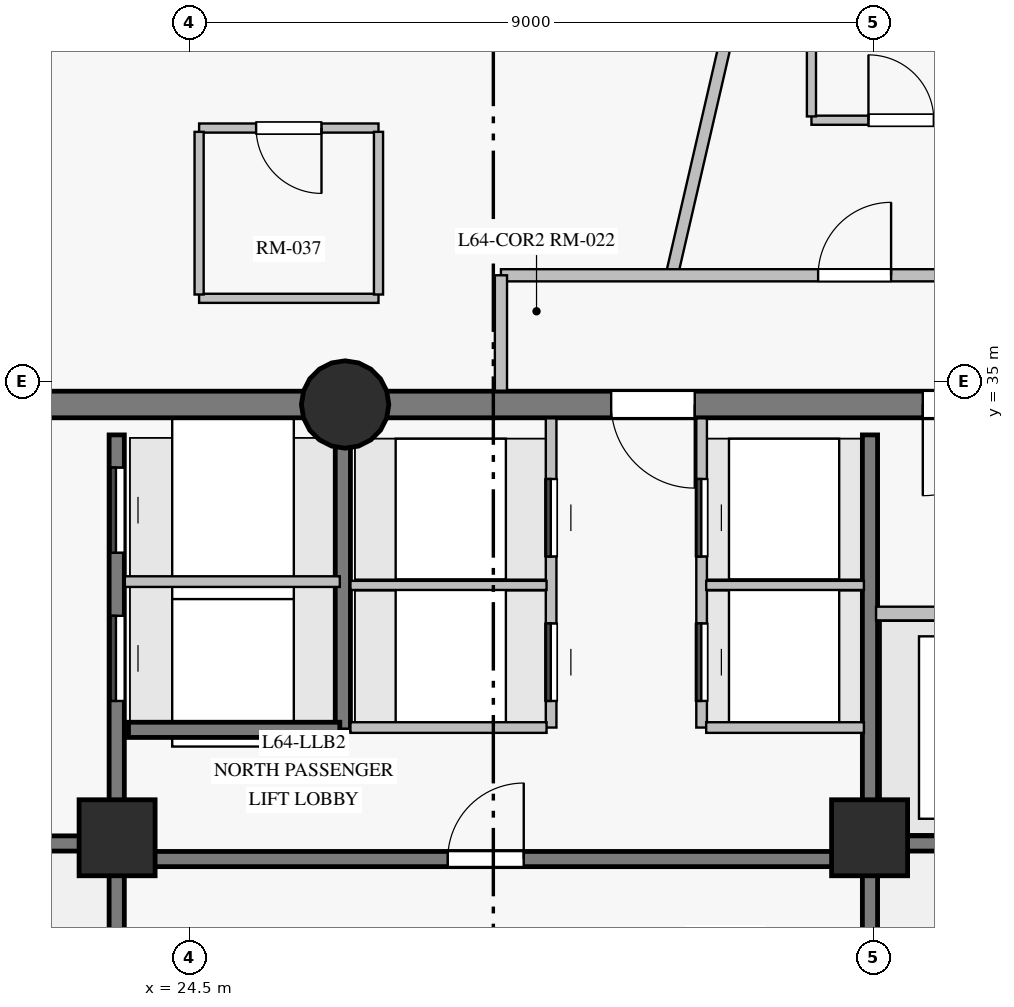
"""IFC4 building model, lengths in metres.
Left out: names, types, materials, properties, quantities, classifications, styles, units other than length and angle.
Written with IfcOpenShell. Run it as: python <this file> out.ifc"""

import sys

from ifc_helpers import new_model, si_unit, direction, frame, frame_2d, origin, origin_with_axes, origin_2d, place, context, subcontext, project, spatial, rectangle, circle, extrude, source, transform, mapped, element, fill, save


model = new_model("IFC4")
c1 = context("Model", 3, precision=1e-05, world=origin(), true_north=direction((0.0, 1.0)))
c2 = subcontext(c1, "Body", "Model", "MODEL_VIEW")
j1 = project(units=[si_unit("LENGTHUNIT", "METRE"), si_unit("PLANEANGLEUNIT", "RADIAN")], contexts=[c1])
p1 = place(None, origin())
s1 = spatial("IfcSite", under=j1, at=p1, CompositionType="ELEMENT")
p2 = place(p1, origin())
s2 = spatial("IfcBuilding", under=s1, at=p2, CompositionType="ELEMENT")
p3 = place(p2, frame((0.0, 0.0, 219.95)))
s3 = spatial("IfcBuildingStorey", under=s2, at=p3, CompositionType="ELEMENT", Elevation=219.95)
p4 = place(p3, frame((37.5, 34.7, 0.0), z_axis=(0.0, 0.0, 1.0), x_axis=(-1.0, 0.0, 0.0)))
e1 = element("IfcWall", 1, at=p4, inside=s3, PredefinedType="SHEAR", context=c2, shape_type="SweptSolid", body=[
    extrude(rectangle(XDim=10.95, YDim=0.35, at=frame_2d((5.475, 0.0))), origin(), (0.0, 0.0, 1.0), 2.85),
])
p5 = place(p4, frame((2.15, 0.0, 0.0)))
e2 = element("IfcOpeningElement", 2, at=p5, cuts=e1, PredefinedType="OPENING", context=c2, shape_type="SweptSolid", body=[
    extrude(rectangle(XDim=1.2, YDim=2.15, at=frame_2d((0.6, 1.075))), frame((0.0, 0.185, 0.0), z_axis=(0.0, -1.0, 0.0), x_axis=(1.0, 0.0, 0.0)), (0.0, 0.0, 1.0), 0.37),
])
p6 = place(p4, frame((6.35, 0.0, 0.0)))
e3 = element("IfcOpeningElement", 3, at=p6, cuts=e1, PredefinedType="OPENING", context=c2, shape_type="SweptSolid", body=[
    extrude(rectangle(XDim=1.1, YDim=2.15, at=frame_2d((0.55, 1.075))), frame((0.0, 0.185, 0.0), z_axis=(0.0, -1.0, 0.0), x_axis=(1.0, 0.0, 0.0)), (0.0, 0.0, 1.0), 0.37),
])
p7 = place(p3, frame((26.55, 34.7, 0.0), z_axis=(0.0, 0.0, 1.0), x_axis=(-1.0, 0.0, 0.0)))
e4 = element("IfcWall", 4, at=p7, inside=s3, PredefinedType="SHEAR", context=c2, shape_type="SweptSolid", body=[
    extrude(rectangle(XDim=7.05, YDim=0.35, at=frame_2d((3.525, 0.0))), origin(), (0.0, 0.0, 1.0), 2.85),
])
m1 = source(origin_with_axes(), c2, "Body", "SweptSolid", [
    extrude(circle(Radius=0.575, at=origin_2d()), origin(), (0.0, 0.0, 1.0), 3.05),
])
p8 = place(p3, frame((26.55, 34.7, 0.0), z_axis=(0.0, 0.0, 1.0), x_axis=(1.0, 0.0, 0.0)))
e5 = element("IfcColumn", 5, at=p8, inside=s3, PredefinedType="COLUMN", context=c2, shape_type="MappedRepresentation", body=[
    mapped(m1, transform((0.0, 0.0, 0.0), scale=1.0)),
])
m2 = source(origin_with_axes(), c2, "Body", "SweptSolid", [
    extrude(rectangle(XDim=1.0, YDim=1.0, at=origin_2d()), origin(), (0.0, 0.0, 1.0), 3.05),
])
for number, where, z_axis, x_axis in (
    (6, (23.55, 29.0, 0.0), (0.0, 0.0, 1.0), (1.0, 0.0, 0.0)),
    (7, (33.45, 29.0, 0.0), (0.0, 0.0, 1.0), (1.0, 0.0, 0.0)),
):
    element("IfcColumn", number, at=place(p3, frame(where, z_axis=z_axis, x_axis=x_axis)), inside=s3, PredefinedType="COLUMN", context=c2, shape_type="MappedRepresentation", body=[
        mapped(m2, transform((0.0, 0.0, 0.0), scale=1.0)),
    ])
p9 = place(p3, frame((23.545, 18.7, 0.0), z_axis=(0.0, 0.0, 1.0), x_axis=(0.0, 1.0, 0.0)))
e8 = element("IfcWall", 8, at=p9, inside=s3, PredefinedType="SHEAR", context=c2, shape_type="SweptSolid", body=[
    extrude(rectangle(XDim=15.6, YDim=0.2, at=frame_2d((7.8, 0.0))), origin(), (0.0, 0.0, 1.0), 2.85),
])
p10 = place(p9, frame((2.75, 0.0, 0.0)))
e9 = element("IfcOpeningElement", 9, at=p10, cuts=e8, PredefinedType="OPENING", context=c2, shape_type="SweptSolid", body=[
    extrude(rectangle(XDim=1.15, YDim=2.15, at=frame_2d((0.575, 1.075))), frame((0.0, 0.11, 0.0), z_axis=(0.0, -1.0, 0.0), x_axis=(1.0, 0.0, 0.0)), (0.0, 0.0, 1.0), 0.22),
])
p11 = place(p9, frame((0.14, 0.0, 0.0)))
e10 = element("IfcOpeningElement", 10, at=p11, cuts=e8, PredefinedType="OPENING", context=c2, shape_type="SweptSolid", body=[
    extrude(rectangle(XDim=0.88, YDim=2.1, at=frame_2d((0.44, 1.05))), frame((0.0, 0.11, 0.0), z_axis=(0.0, -1.0, 0.0), x_axis=(1.0, 0.0, 0.0)), (0.0, 0.0, 1.0), 0.22),
])
p12 = place(p9, frame((1.36, 0.0, 0.0)))
e11 = element("IfcOpeningElement", 11, at=p12, cuts=e8, PredefinedType="OPENING", context=c2, shape_type="SweptSolid", body=[
    extrude(rectangle(XDim=0.88, YDim=2.1, at=frame_2d((0.44, 1.05))), frame((0.0, 0.11, 0.0), z_axis=(0.0, -1.0, 0.0), x_axis=(1.0, 0.0, 0.0)), (0.0, 0.0, 1.0), 0.22),
])
p13 = place(p9, frame((12.1, 0.0, 0.0)))
e12 = element("IfcOpeningElement", 12, at=p13, cuts=e8, PredefinedType="OPENING", context=c2, shape_type="SweptSolid", body=[
    extrude(rectangle(XDim=1.12, YDim=2.15, at=frame_2d((0.56, 1.075))), frame((0.0, 0.11, 0.0), z_axis=(0.0, -1.0, 0.0), x_axis=(1.0, 0.0, 0.0)), (0.0, 0.0, 1.0), 0.22),
])
p14 = place(p9, frame((14.05, 0.0, 0.0)))
e13 = element("IfcOpeningElement", 13, at=p14, cuts=e8, PredefinedType="OPENING", context=c2, shape_type="SweptSolid", body=[
    extrude(rectangle(XDim=1.12, YDim=2.15, at=frame_2d((0.56, 1.075))), frame((0.0, 0.11, 0.0), z_axis=(0.0, -1.0, 0.0), x_axis=(1.0, 0.0, 0.0)), (0.0, 0.0, 1.0), 0.22),
])
p15 = place(p3, frame((33.455, 18.7, 0.0), z_axis=(0.0, 0.0, 1.0), x_axis=(0.0, 1.0, 0.0)))
e14 = element("IfcWall", 14, at=p15, inside=s3, PredefinedType="SHEAR", context=c2, shape_type="SweptSolid", body=[
    extrude(rectangle(XDim=15.6, YDim=0.2, at=frame_2d((7.8, 0.0))), origin(), (0.0, 0.0, 1.0), 2.85),
])
p16 = place(p15, frame((2.75, 0.0, 0.0)))
e15 = element("IfcOpeningElement", 15, at=p16, cuts=e14, PredefinedType="OPENING", context=c2, shape_type="SweptSolid", body=[
    extrude(rectangle(XDim=1.15, YDim=2.15, at=frame_2d((0.575, 1.075))), frame((0.0, 0.11, 0.0), z_axis=(0.0, -1.0, 0.0), x_axis=(1.0, 0.0, 0.0)), (0.0, 0.0, 1.0), 0.22),
])
p17 = place(p15, frame((0.55, 0.0, 0.0)))
e16 = element("IfcOpeningElement", 16, at=p17, cuts=e14, PredefinedType="OPENING", context=c2, shape_type="SweptSolid", body=[
    extrude(rectangle(XDim=0.94, YDim=2.1, at=frame_2d((0.47, 1.05))), frame((0.0, 0.11, 0.0), z_axis=(0.0, -1.0, 0.0), x_axis=(1.0, 0.0, 0.0)), (0.0, 0.0, 1.0), 0.22),
])
p18 = place(p3, frame((23.7, 28.72, 0.0), z_axis=(0.0, 0.0, 1.0), x_axis=(1.0, 0.0, 0.0)))
e17 = element("IfcWall", 17, at=p18, inside=s3, PredefinedType="SHEAR", context=c2, shape_type="SweptSolid", body=[
    extrude(rectangle(XDim=9.6, YDim=0.2, at=frame_2d((4.8, 0.0))), origin(), (0.0, 0.0, 1.0), 2.85),
])
p19 = place(p18, frame((4.2, 0.0, 0.0)))
e18 = element("IfcOpeningElement", 18, at=p19, cuts=e17, PredefinedType="OPENING", context=c2, shape_type="SweptSolid", body=[
    extrude(rectangle(XDim=1.0, YDim=2.15, at=frame_2d((0.5, 1.075))), frame((0.0, 0.11, 0.0), z_axis=(0.0, -1.0, 0.0), x_axis=(1.0, 0.0, 0.0)), (0.0, 0.0, 1.0), 0.22),
])
for number, where, z_axis, x_axis in (
    (19, (33.455, 28.925, 0.0), (0.0, 0.0, 1.0), (1.0, 0.0, 0.0)),
    (20, (19.55, 28.925, 0.0), (0.0, 0.0, 1.0), (1.0, 0.0, 0.0)),
):
    element("IfcWall", number, at=place(p3, frame(where, z_axis=z_axis, x_axis=x_axis)), inside=s3, PredefinedType="SHEAR", context=c2, shape_type="SweptSolid", body=[
        extrude(rectangle(XDim=3.995, YDim=0.2, at=frame_2d((1.998, 0.0))), origin(), (0.0, 0.0, 1.0), 2.85),
    ])
p20 = place(p3, frame((26.52, 30.42, 0.0), z_axis=(0.0, 0.0, 1.0), x_axis=(0.0, 1.0, 0.0)))
e21 = element("IfcWall", 21, at=p20, inside=s3, PredefinedType="SHEAR", context=c2, shape_type="SweptSolid", body=[
    extrude(rectangle(XDim=3.86, YDim=0.2, at=frame_2d((1.93, 0.0))), origin(), (0.0, 0.0, 1.0), 2.85),
])
p21 = place(p3, frame((23.7, 30.42, 0.0), z_axis=(0.0, 0.0, 1.0), x_axis=(1.0, 0.0, 0.0)))
e22 = element("IfcWall", 22, at=p21, inside=s3, PredefinedType="SHEAR", context=c2, shape_type="SweptSolid", body=[
    extrude(rectangle(XDim=2.78, YDim=0.2, at=frame_2d((1.39, 0.0))), origin(), (0.0, 0.0, 1.0), 2.85),
])
p22 = place(p3, frame((30.84, 36.371, 0.0), z_axis=(0.0, 0.0, 1.0), x_axis=(0.224958696118, 0.974368300511, 0.0)))
e23 = element("IfcWall", 23, at=p22, inside=s3, PredefinedType="PARTITIONING", context=c2, shape_type="SweptSolid", body=[
    extrude(rectangle(XDim=11.864, YDim=0.16, at=frame_2d((5.932, 0.0))), origin(), (0.0, 0.0, 1.0), 2.85),
])
p23 = place(p3, frame((28.6, 36.4, 0.0), z_axis=(0.0, 0.0, 1.0), x_axis=(1.0, 0.0, 0.0)))
e24 = element("IfcWall", 24, at=p23, inside=s3, PredefinedType="PARTITIONING", context=c2, shape_type="SweptSolid", body=[
    extrude(rectangle(XDim=6.95, YDim=0.16, at=frame_2d((3.475, 0.0))), origin(), (0.0, 0.0, 1.0), 2.45),
])
p24 = place(p23, frame((4.173, 0.0, 0.0)))
e25 = element("IfcOpeningElement", 25, at=p24, cuts=e24, PredefinedType="OPENING", context=c2, shape_type="SweptSolid", body=[
    extrude(rectangle(XDim=0.96, YDim=2.15, at=frame_2d((0.48, 1.075))), frame((0.0, 0.09, 0.0), z_axis=(0.0, -1.0, 0.0), x_axis=(1.0, 0.0, 0.0)), (0.0, 0.0, 1.0), 0.18),
])
p25 = place(p3, frame((29.26, 30.45, 0.0), z_axis=(0.0, 0.0, 1.0), x_axis=(0.0, 1.0, 0.0)))
e26 = element("IfcWall", 26, at=p25, inside=s3, PredefinedType="PARTITIONING", context=c2, shape_type="SweptSolid", body=[
    extrude(rectangle(XDim=4.068, YDim=0.14, at=frame_2d((2.034, 0.0))), origin(), (0.0, 0.0, 1.0), 2.85),
])
p26 = place(p25, frame((0.35, 0.0, 0.0)))
e27 = element("IfcOpeningElement", 27, at=p26, cuts=e26, PredefinedType="OPENING", context=c2, shape_type="SweptSolid", body=[
    extrude(rectangle(XDim=1.02, YDim=2.15, at=frame_2d((0.51, 1.075))), frame((0.0, 0.08, 0.0), z_axis=(0.0, -1.0, 0.0), x_axis=(1.0, 0.0, 0.0)), (0.0, 0.0, 1.0), 0.16),
])
p27 = place(p25, frame((2.25, 0.0, 0.0)))
e28 = element("IfcOpeningElement", 28, at=p27, cuts=e26, PredefinedType="OPENING", context=c2, shape_type="SweptSolid", body=[
    extrude(rectangle(XDim=1.02, YDim=2.15, at=frame_2d((0.51, 1.075))), frame((0.0, 0.08, 0.0), z_axis=(0.0, -1.0, 0.0), x_axis=(1.0, 0.0, 0.0)), (0.0, 0.0, 1.0), 0.16),
])
p28 = place(p3, frame((31.24, 30.45, 0.0), z_axis=(0.0, 0.0, 1.0), x_axis=(0.0, 1.0, 0.0)))
e29 = element("IfcWall", 29, at=p28, inside=s3, PredefinedType="PARTITIONING", context=c2, shape_type="SweptSolid", body=[
    extrude(rectangle(XDim=4.068, YDim=0.14, at=frame_2d((2.034, 0.0))), origin(), (0.0, 0.0, 1.0), 2.85),
])
p29 = place(p28, frame((0.35, 0.0, 0.0)))
e30 = element("IfcOpeningElement", 30, at=p29, cuts=e29, PredefinedType="OPENING", context=c2, shape_type="SweptSolid", body=[
    extrude(rectangle(XDim=1.02, YDim=2.15, at=frame_2d((0.51, 1.075))), frame((0.0, 0.08, 0.0), z_axis=(0.0, -1.0, 0.0), x_axis=(1.0, 0.0, 0.0)), (0.0, 0.0, 1.0), 0.16),
])
p30 = place(p28, frame((2.25, 0.0, 0.0)))
e31 = element("IfcOpeningElement", 31, at=p30, cuts=e29, PredefinedType="OPENING", context=c2, shape_type="SweptSolid", body=[
    extrude(rectangle(XDim=1.02, YDim=2.15, at=frame_2d((0.51, 1.075))), frame((0.0, 0.08, 0.0), z_axis=(0.0, -1.0, 0.0), x_axis=(1.0, 0.0, 0.0)), (0.0, 0.0, 1.0), 0.16),
])
p31 = place(p3, frame((33.535, 31.95, 0.0), z_axis=(0.0, 0.0, 1.0), x_axis=(1.0, 0.0, 0.0)))
e32 = element("IfcWall", 32, at=p31, inside=s3, PredefinedType="PARTITIONING", context=c2, shape_type="SweptSolid", body=[
    extrude(rectangle(XDim=3.784, YDim=0.18, at=frame_2d((1.892, 0.0))), origin(), (0.0, 0.0, 1.0), 2.85),
])
p32 = place(p31, frame((0.9, 0.0, 0.0)))
e33 = element("IfcOpeningElement", 33, at=p32, cuts=e32, PredefinedType="OPENING", context=c2, shape_type="SweptSolid", body=[
    extrude(rectangle(XDim=1.3, YDim=2.2, at=frame_2d((0.65, 1.1))), frame((0.0, 0.1, 0.0), z_axis=(0.0, -1.0, 0.0), x_axis=(1.0, 0.0, 0.0)), (0.0, 0.0, 1.0), 0.2),
])
p33 = place(p3, frame((23.652, 32.37, 0.0), z_axis=(0.0, 0.0, 1.0), x_axis=(1.0, 0.0, 0.0)))
e34 = element("IfcWall", 34, at=p33, inside=s3, PredefinedType="PARTITIONING", context=c2, shape_type="SweptSolid", body=[
    extrude(rectangle(XDim=2.828, YDim=0.14, at=frame_2d((1.414, 0.0))), origin(), (0.0, 0.0, 1.0), 2.85),
])
p34 = place(p3, frame((26.62, 30.45, 0.0), z_axis=(0.0, 0.0, 1.0), x_axis=(1.0, 0.0, 0.0)))
e35 = element("IfcWall", 35, at=p34, inside=s3, PredefinedType="PARTITIONING", context=c2, shape_type="SweptSolid", body=[
    extrude(rectangle(XDim=2.58, YDim=0.14, at=frame_2d((1.29, 0.0))), origin(), (0.0, 0.0, 1.0), 2.85),
])
p35 = place(p3, frame((26.62, 32.32, 0.0), z_axis=(0.0, 0.0, 1.0), x_axis=(1.0, 0.0, 0.0)))
e36 = element("IfcWall", 36, at=p35, inside=s3, PredefinedType="PARTITIONING", context=c2, shape_type="SweptSolid", body=[
    extrude(rectangle(XDim=2.58, YDim=0.12, at=frame_2d((1.29, 0.0))), origin(), (0.0, 0.0, 1.0), 2.85),
])
p36 = place(p3, frame((32.685, 38.44, 0.0), z_axis=(0.0, 0.0, 1.0), x_axis=(1.0, 0.0, 0.0)))
e37 = element("IfcWall", 37, at=p36, inside=s3, PredefinedType="PARTITIONING", context=c2, shape_type="SweptSolid", body=[
    extrude(rectangle(XDim=2.36, YDim=0.12, at=frame_2d((1.18, 0.0))), origin(), (0.0, 0.0, 1.0), 2.3),
])
p37 = place(p36, frame((0.75, 0.0, 0.0)))
e38 = element("IfcOpeningElement", 38, at=p37, cuts=e37, PredefinedType="OPENING", context=c2, shape_type="SweptSolid", body=[
    extrude(rectangle(XDim=0.86, YDim=2.1, at=frame_2d((0.43, 1.05))), frame((0.0, 0.07, 0.0), z_axis=(0.0, -1.0, 0.0), x_axis=(1.0, 0.0, 0.0)), (0.0, 0.0, 1.0), 0.14),
])
p38 = place(p3, frame((24.629, 36.097, 0.0), z_axis=(0.0, 0.0, 1.0), x_axis=(1.0, 0.0, 0.0)))
e39 = element("IfcWall", 39, at=p38, inside=s3, PredefinedType="PARTITIONING", context=c2, shape_type="SweptSolid", body=[
    extrude(rectangle(XDim=2.36, YDim=0.12, at=frame_2d((1.18, 0.0))), origin(), (0.0, 0.0, 1.0), 2.45),
])
p39 = place(p3, frame((26.989, 38.337, 0.0), z_axis=(0.0, 0.0, 1.0), x_axis=(-1.0, 0.0, 0.0)))
e40 = element("IfcWall", 40, at=p39, inside=s3, PredefinedType="PARTITIONING", context=c2, shape_type="SweptSolid", body=[
    extrude(rectangle(XDim=2.36, YDim=0.12, at=frame_2d((1.18, 0.0))), origin(), (0.0, 0.0, 1.0), 2.45),
])
p40 = place(p39, frame((0.75, 0.0, 0.0)))
e41 = element("IfcOpeningElement", 41, at=p40, cuts=e40, PredefinedType="OPENING", context=c2, shape_type="SweptSolid", body=[
    extrude(rectangle(XDim=0.86, YDim=2.1, at=frame_2d((0.43, 1.05))), frame((0.0, 0.07, 0.0), z_axis=(0.0, -1.0, 0.0), x_axis=(1.0, 0.0, 0.0)), (0.0, 0.0, 1.0), 0.14),
])
p41 = place(p3, frame((32.685, 40.63, 0.0), z_axis=(0.0, 0.0, 1.0), x_axis=(0.0, -1.0, 0.0)))
e42 = element("IfcWall", 42, at=p41, inside=s3, PredefinedType="PARTITIONING", context=c2, shape_type="SweptSolid", body=[
    extrude(rectangle(XDim=2.14, YDim=0.12, at=frame_2d((1.07, 0.0))), origin(), (0.0, 0.0, 1.0), 2.85),
])
p42 = place(p3, frame((26.989, 36.147, 0.0), z_axis=(0.0, 0.0, 1.0), x_axis=(0.0, 1.0, 0.0)))
e43 = element("IfcWall", 43, at=p42, inside=s3, PredefinedType="PARTITIONING", context=c2, shape_type="SweptSolid", body=[
    extrude(rectangle(XDim=2.14, YDim=0.12, at=frame_2d((1.07, 0.0))), origin(), (0.0, 0.0, 1.0), 2.35),
])
p43 = place(p3, frame((24.629, 38.287, 0.0), z_axis=(0.0, 0.0, 1.0), x_axis=(0.0, -1.0, 0.0)))
e44 = element("IfcWall", 44, at=p43, inside=s3, PredefinedType="PARTITIONING", context=c2, shape_type="SweptSolid", body=[
    extrude(rectangle(XDim=2.14, YDim=0.12, at=frame_2d((1.07, 0.0))), origin(), (0.0, 0.0, 1.0), 2.85),
])
p44 = place(p3, frame((31.3, 30.45, 0.0), z_axis=(0.0, 0.0, 1.0), x_axis=(1.0, 0.0, 0.0)))
e45 = element("IfcWall", 45, at=p44, inside=s3, PredefinedType="PARTITIONING", context=c2, shape_type="SweptSolid", body=[
    extrude(rectangle(XDim=2.075, YDim=0.14, at=frame_2d((1.038, 0.0))), origin(), (0.0, 0.0, 1.0), 2.85),
])
p45 = place(p3, frame((31.3, 32.32, 0.0), z_axis=(0.0, 0.0, 1.0), x_axis=(1.0, 0.0, 0.0)))
e46 = element("IfcWall", 46, at=p45, inside=s3, PredefinedType="PARTITIONING", context=c2, shape_type="SweptSolid", body=[
    extrude(rectangle(XDim=2.075, YDim=0.12, at=frame_2d((1.038, 0.0))), origin(), (0.0, 0.0, 1.0), 2.85),
])
p46 = place(p3, frame((28.6, 34.882, 0.0), z_axis=(0.0, 0.0, 1.0), x_axis=(0.0, 1.0, 0.0)))
e47 = element("IfcWall", 47, at=p46, inside=s3, PredefinedType="PARTITIONING", context=c2, shape_type="SweptSolid", body=[
    extrude(rectangle(XDim=1.518, YDim=0.16, at=frame_2d((0.759, 0.0))), origin(), (0.0, 0.0, 1.0), 2.85),
])
m3 = source(origin_with_axes(), c2, "Body", "SweptSolid", [
    extrude(rectangle(XDim=1.2, YDim=2.15, at=frame_2d((0.6, 1.075))), frame((0.0, 0.025, 0.0), z_axis=(0.0, -1.0, 0.0), x_axis=(1.0, 0.0, 0.0)), (0.0, 0.0, 1.0), 0.05),
])
p47 = place(p5, origin())
e48 = element("IfcDoor", 48, at=p47, inside=s3, OperationType="SINGLE_SWING_RIGHT", PredefinedType="DOOR", context=c2, shape_type="MappedRepresentation", body=[
    mapped(m3, transform((0.0, 0.0, 0.0), scale=1.0)),
])
fill(e2, e48)
m4 = source(origin_with_axes(), c2, "Body", "SweptSolid", [
    extrude(rectangle(XDim=1.0, YDim=2.15, at=frame_2d((0.5, 1.075))), frame((0.0, 0.025, 0.0), z_axis=(0.0, -1.0, 0.0), x_axis=(1.0, 0.0, 0.0)), (0.0, 0.0, 1.0), 0.05),
])
p48 = place(p19, origin())
e49 = element("IfcDoor", 49, at=p48, inside=s3, OperationType="SINGLE_SWING_RIGHT", PredefinedType="DOOR", context=c2, shape_type="MappedRepresentation", body=[
    mapped(m4, transform((0.0, 0.0, 0.0), scale=1.0)),
])
fill(e18, e49)
m5 = source(origin_with_axes(), c2, "Body", "SweptSolid", [
    extrude(rectangle(XDim=1.1, YDim=2.15, at=frame_2d((0.55, 1.075))), frame((0.0, 0.025, 0.0), z_axis=(0.0, -1.0, 0.0), x_axis=(1.0, 0.0, 0.0)), (0.0, 0.0, 1.0), 0.05),
])
p49 = place(p6, origin())
e50 = element("IfcDoor", 50, at=p49, inside=s3, OperationType="SINGLE_SWING_LEFT", PredefinedType="DOOR", context=c2, shape_type="MappedRepresentation", body=[
    mapped(m5, transform((0.0, 0.0, 0.0), scale=1.0)),
])
fill(e3, e50)
m6 = source(origin_with_axes(), c2, "Body", "SweptSolid", [
    extrude(rectangle(XDim=1.12, YDim=2.15, at=frame_2d((0.56, 1.075))), frame((0.0, 0.025, 0.0), z_axis=(0.0, -1.0, 0.0), x_axis=(1.0, 0.0, 0.0)), (0.0, 0.0, 1.0), 0.05),
])
p50 = place(p13, origin())
e51 = element("IfcDoor", 51, at=p50, inside=s3, OperationType="SLIDING_TO_LEFT", PredefinedType="DOOR", context=c2, shape_type="MappedRepresentation", body=[
    mapped(m6, transform((0.0, 0.0, 0.0), scale=1.0)),
])
fill(e12, e51)
p51 = place(p14, origin())
e52 = element("IfcDoor", 52, at=p51, inside=s3, OperationType="SLIDING_TO_RIGHT", PredefinedType="DOOR", context=c2, shape_type="MappedRepresentation", body=[
    mapped(m6, transform((0.0, 0.0, 0.0), scale=1.0)),
])
fill(e13, e52)
m7 = source(origin_with_axes(), c2, "Body", "SweptSolid", [
    extrude(rectangle(XDim=1.02, YDim=2.15, at=frame_2d((0.51, 1.075))), frame((0.0, 0.025, 0.0), z_axis=(0.0, -1.0, 0.0), x_axis=(1.0, 0.0, 0.0)), (0.0, 0.0, 1.0), 0.05),
])
p52 = place(p26, origin())
e53 = element("IfcDoor", 53, at=p52, inside=s3, OperationType="SLIDING_TO_LEFT", PredefinedType="DOOR", context=c2, shape_type="MappedRepresentation", body=[
    mapped(m7, transform((0.0, 0.0, 0.0), scale=1.0)),
])
fill(e27, e53)
p53 = place(p27, origin())
e54 = element("IfcDoor", 54, at=p53, inside=s3, OperationType="SLIDING_TO_LEFT", PredefinedType="DOOR", context=c2, shape_type="MappedRepresentation", body=[
    mapped(m7, transform((0.0, 0.0, 0.0), scale=1.0)),
])
fill(e28, e54)
p54 = place(p29, origin())
e55 = element("IfcDoor", 55, at=p54, inside=s3, OperationType="SLIDING_TO_LEFT", PredefinedType="DOOR", context=c2, shape_type="MappedRepresentation", body=[
    mapped(m7, transform((0.0, 0.0, 0.0), scale=1.0)),
])
fill(e30, e55)
p55 = place(p30, origin())
e56 = element("IfcDoor", 56, at=p55, inside=s3, OperationType="SLIDING_TO_LEFT", PredefinedType="DOOR", context=c2, shape_type="MappedRepresentation", body=[
    mapped(m7, transform((0.0, 0.0, 0.0), scale=1.0)),
])
fill(e31, e56)
m8 = source(origin_with_axes(), c2, "Body", "SweptSolid", [
    extrude(rectangle(XDim=0.86, YDim=2.1, at=frame_2d((0.43, 1.05))), frame((0.0, 0.025, 0.0), z_axis=(0.0, -1.0, 0.0), x_axis=(1.0, 0.0, 0.0)), (0.0, 0.0, 1.0), 0.05),
])
p56 = place(p37, origin())
e57 = element("IfcDoor", 57, at=p56, inside=s3, OperationType="SINGLE_SWING_LEFT", PredefinedType="DOOR", context=c2, shape_type="MappedRepresentation", body=[
    mapped(m8, transform((0.0, 0.0, 0.0), scale=1.0)),
])
fill(e38, e57)
m9 = source(origin_with_axes(), c2, "Body", "SweptSolid", [
    extrude(rectangle(XDim=0.96, YDim=2.15, at=frame_2d((0.48, 1.075))), frame((0.0, 0.025, 0.0), z_axis=(0.0, -1.0, 0.0), x_axis=(1.0, 0.0, 0.0)), (0.0, 0.0, 1.0), 0.05),
])
p57 = place(p24, origin())
e58 = element("IfcDoor", 58, at=p57, inside=s3, OperationType="SINGLE_SWING_RIGHT", PredefinedType="DOOR", context=c2, shape_type="MappedRepresentation", body=[
    mapped(m9, transform((0.0, 0.0, 0.0), scale=1.0)),
])
fill(e25, e58)
p58 = place(p40, origin())
e59 = element("IfcDoor", 59, at=p58, inside=s3, OperationType="SINGLE_SWING_LEFT", PredefinedType="DOOR", context=c2, shape_type="MappedRepresentation", body=[
    mapped(m8, transform((0.0, 0.0, 0.0), scale=1.0)),
])
fill(e41, e59)
save(model, sys.argv[1])
